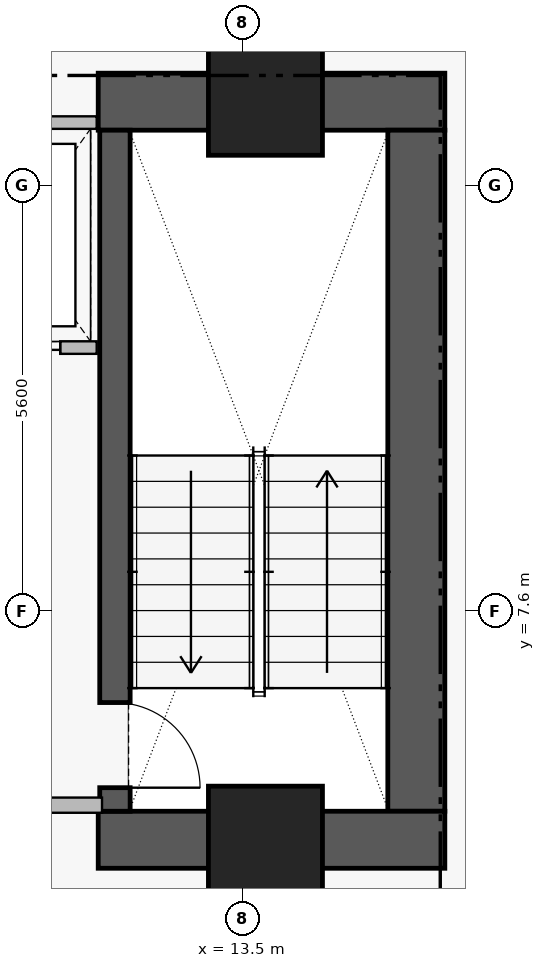
"""IFC4 building model, lengths in metres.
Left out: names, types, materials, properties, quantities, classifications, styles, units other than length and angle.
Written with IfcOpenShell. Run it as: python <this file> out.ifc"""

import sys

from ifc_helpers import new_model, si_unit, direction, frame, frame_2d, origin, origin_2d, place, context, subcontext, project, spatial, rectangle, extrude, element, fill, save


model = new_model("IFC4")
c1 = context("Model", 3, precision=1e-05, world=origin(), true_north=direction((0.0, 1.0)))
c2 = subcontext(c1, "Body", "Model", "MODEL_VIEW")
j1 = project(units=[si_unit("LENGTHUNIT", "METRE"), si_unit("PLANEANGLEUNIT", "RADIAN")], contexts=[c1])
p1 = place(None, origin())
s1 = spatial("IfcSite", under=j1, at=p1, CompositionType="ELEMENT")
p2 = place(p1, origin())
s2 = spatial("IfcBuilding", under=s1, at=p2, CompositionType="ELEMENT")
p3 = place(p2, frame((0.0, 0.0, 128.5)))
s3 = spatial("IfcBuildingStorey", under=s2, at=p3, CompositionType="ELEMENT", Elevation=128.5)
p4 = place(p3, frame((11.6, 14.305, 0.0), z_axis=(0.0, 0.0, 1.0), x_axis=(1.0, 0.0, 0.0)))
e1 = element("IfcWall", 1, at=p4, inside=s3, PredefinedType="SHEAR", context=c2, shape_type="SweptSolid", body=[
    extrude(rectangle(XDim=4.56, YDim=0.75, at=frame_2d((2.28, 0.0))), origin(), (0.0, 0.0, 1.0), 3.46),
])
p5 = place(p3, frame((15.785, 4.97, 0.0), z_axis=(0.0, 0.0, 1.0), x_axis=(0.0, 1.0, 0.0)))
e2 = element("IfcWall", 2, at=p5, inside=s3, PredefinedType="SHEAR", context=c2, shape_type="SweptSolid", body=[
    extrude(rectangle(XDim=8.96, YDim=0.75, at=frame_2d((4.48, 0.0))), origin(), (0.0, 0.0, 1.0), 3.46),
])
p6 = place(p3, frame((11.6, 4.595, 0.0), z_axis=(0.0, 0.0, 1.0), x_axis=(1.0, 0.0, 0.0)))
e3 = element("IfcWall", 3, at=p6, inside=s3, PredefinedType="SHEAR", context=c2, shape_type="SweptSolid", body=[
    extrude(rectangle(XDim=4.56, YDim=0.75, at=frame_2d((2.28, 0.0))), origin(), (0.0, 0.0, 1.0), 3.46),
])
p7 = place(p3, frame((11.82, 13.93, 0.0), z_axis=(0.0, 0.0, 1.0), x_axis=(0.0, -1.0, 0.0)))
e4 = element("IfcWall", 4, at=p7, inside=s3, PredefinedType="SHEAR", context=c2, shape_type="SweptSolid", body=[
    extrude(rectangle(XDim=8.96, YDim=0.4, at=frame_2d((4.48, 0.0))), origin(), (0.0, 0.0, 1.0), 3.46),
])
p8 = place(p7, frame((7.53, 0.0, 0.0)))
e5 = element("IfcOpeningElement", 5, at=p8, cuts=e4, PredefinedType="OPENING", context=c2, shape_type="SweptSolid", body=[
    extrude(rectangle(XDim=1.12, YDim=2.22, at=frame_2d((0.56, 1.11))), frame((0.0, 0.21, 0.0), z_axis=(0.0, -1.0, 0.0), x_axis=(1.0, 0.0, 0.0)), (0.0, 0.0, 1.0), 0.42),
])
for number, where, z_axis, x_axis in (
    (6, (13.8, 14.35, 0.0), (0.0, 0.0, 1.0), (1.0, 0.0, 0.0)),
    (7, (13.8, 4.55, 0.0), (0.0, 0.0, 1.0), (1.0, 0.0, 0.0)),
):
    element("IfcColumn", number, at=place(p3, frame(where, z_axis=z_axis, x_axis=x_axis)), inside=s3, PredefinedType="COLUMN", context=c2, shape_type="SweptSolid", body=[
        extrude(rectangle(XDim=1.5, YDim=1.5, at=origin_2d()), origin(), (0.0, 0.0, 1.0), 3.65),
    ])
p9 = place(p3, frame((9.42, 11.07, 0.0), z_axis=(0.0, 0.0, 1.0), x_axis=(1.0, 0.0, 0.0)))
e8 = element("IfcWall", 8, at=p9, inside=s3, PredefinedType="PARTITIONING", context=c2, shape_type="SweptSolid", body=[
    extrude(rectangle(XDim=2.16, YDim=0.165, at=frame_2d((1.08, 0.0))), origin(), (0.0, 0.0, 1.0), 3.43),
])
p10 = place(p9, frame((0.53, 0.0, 0.0)))
e9 = element("IfcOpeningElement", 9, at=p10, cuts=e8, PredefinedType="OPENING", context=c2, shape_type="SweptSolid", body=[
    extrude(rectangle(XDim=1.15, YDim=2.25, at=frame_2d((0.575, 1.125))), frame((0.0, 0.093, 0.0), z_axis=(0.0, -1.0, 0.0), x_axis=(1.0, 0.0, 0.0)), (0.0, 0.0, 1.0), 0.185),
])
p11 = place(p3, frame((8.8, 5.05, 0.0), z_axis=(0.0, 0.0, 1.0), x_axis=(1.0, 0.0, 0.0)))
e10 = element("IfcWall", 10, at=p11, inside=s3, PredefinedType="PARTITIONING", context=c2, shape_type="SweptSolid", body=[
    extrude(rectangle(XDim=2.85, YDim=0.2, at=frame_2d((1.425, 0.0))), origin(), (0.0, 0.0, 1.0), 3.43),
])
p12 = place(p3, frame((9.42, 14.03, 0.0), z_axis=(0.0, 0.0, 1.0), x_axis=(1.0, 0.0, 0.0)))
e11 = element("IfcWall", 11, at=p12, inside=s3, PredefinedType="PARTITIONING", context=c2, shape_type="SweptSolid", body=[
    extrude(rectangle(XDim=2.16, YDim=0.165, at=frame_2d((1.08, 0.0))), origin(), (0.0, 0.0, 1.0), 3.43),
])
p13 = place(p8, origin())
e12 = element("IfcDoor", 12, at=p13, inside=s3, OperationType="SINGLE_SWING_RIGHT", PredefinedType="DOOR", context=c2, shape_type="SweptSolid", body=[
    extrude(rectangle(XDim=1.12, YDim=2.22, at=frame_2d((0.56, 1.11))), frame((0.0, 0.025, 0.0), z_axis=(0.0, -1.0, 0.0), x_axis=(1.0, 0.0, 0.0)), (0.0, 0.0, 1.0), 0.05),
])
fill(e5, e12)
p14 = place(p10, origin())
e13 = element("IfcDoor", 13, at=p14, inside=s3, OperationType="SLIDING_TO_LEFT", PredefinedType="DOOR", context=c2, shape_type="SweptSolid", body=[
    extrude(rectangle(XDim=1.15, YDim=2.25, at=frame_2d((0.575, 1.125))), frame((0.0, 0.025, 0.0), z_axis=(0.0, -1.0, 0.0), x_axis=(1.0, 0.0, 0.0)), (0.0, 0.0, 1.0), 0.05),
])
fill(e9, e13)
save(model, sys.argv[1])
